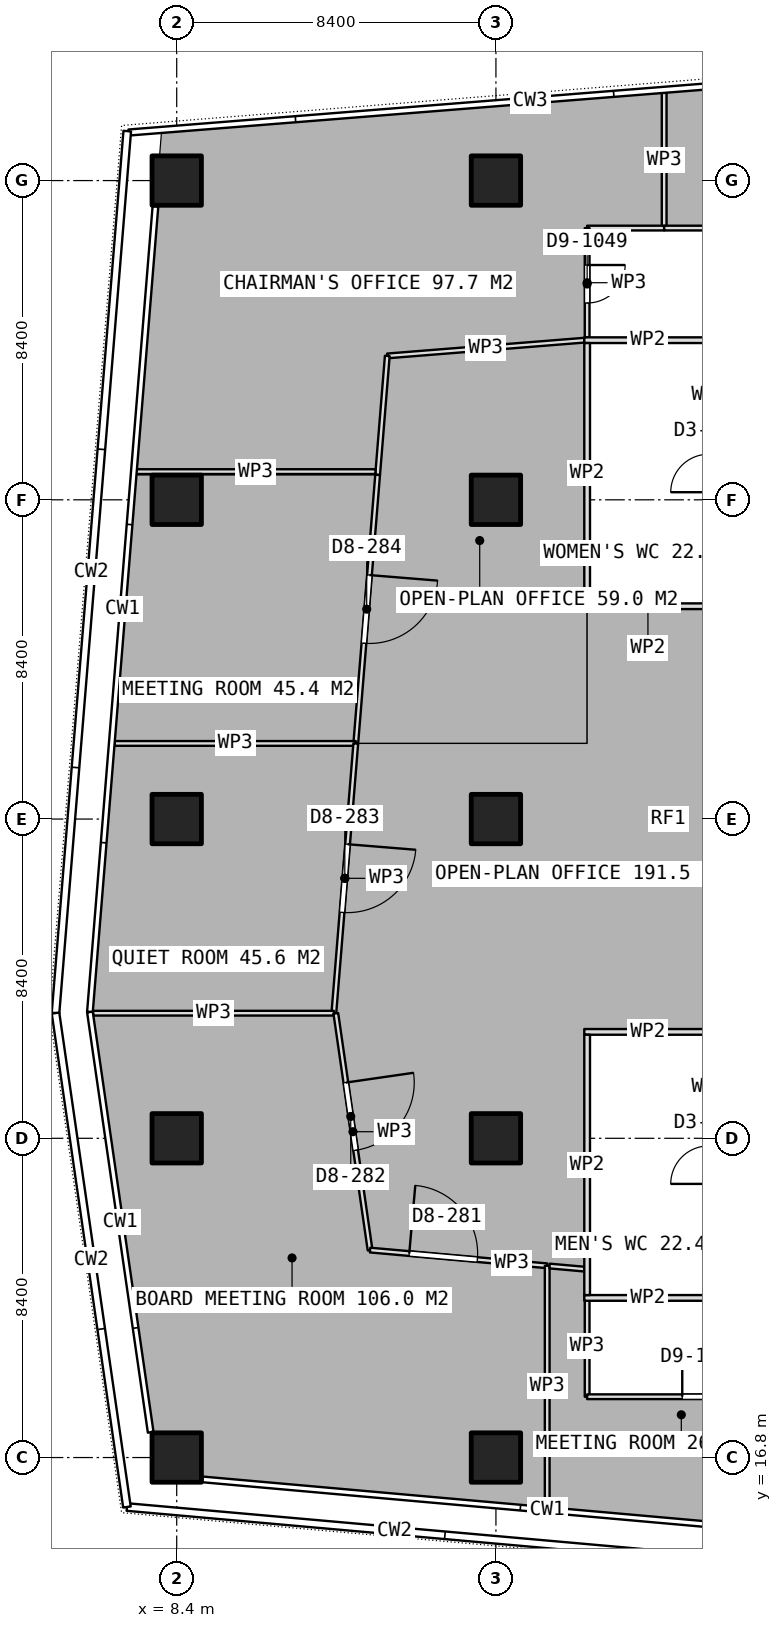
"""IFC4 building model, lengths in metres.
Left out: names, types, materials, properties, quantities, classifications, styles, units other than length and angle.
Written with IfcOpenShell. Run it as: python <this file> out.ifc"""

import sys

from ifc_helpers import new_model, si_unit, direction, frame, frame_2d, origin, origin_2d, place, context, subcontext, project, spatial, rectangle, extrude, element, fill, save


model = new_model("IFC4")
c1 = context("Model", 3, precision=1e-05, world=origin(), true_north=direction((0.0, 1.0)))
c2 = subcontext(c1, "Body", "Model", "MODEL_VIEW")
j1 = project(units=[si_unit("LENGTHUNIT", "METRE"), si_unit("PLANEANGLEUNIT", "RADIAN")], contexts=[c1])
p1 = place(None, origin())
s1 = spatial("IfcSite", under=j1, at=p1, CompositionType="ELEMENT")
p2 = place(p1, origin())
s2 = spatial("IfcBuilding", under=s1, at=p2, CompositionType="ELEMENT")
p3 = place(p2, frame((0.0, 0.0, 283.85)))
s3 = spatial("IfcBuildingStorey", under=s2, at=p3, CompositionType="ELEMENT", Elevation=283.85)
for number, where, z_axis, x_axis in (
    (1, (8.4, 16.8, 0.0), (0.0, 0.0, 1.0), (1.0, 0.0, 0.0)),
    (2, (8.4, 25.2, 0.0), (0.0, 0.0, 1.0), (1.0, 0.0, 0.0)),
    (3, (8.4, 33.6, 0.0), (0.0, 0.0, 1.0), (1.0, 0.0, 0.0)),
    (4, (8.4, 42.0, 0.0), (0.0, 0.0, 1.0), (1.0, 0.0, 0.0)),
    (5, (8.4, 50.4, 0.0), (0.0, 0.0, 1.0), (1.0, 0.0, 0.0)),
    (6, (16.8, 16.8, 0.0), (0.0, 0.0, 1.0), (1.0, 0.0, 0.0)),
    (7, (16.8, 25.2, 0.0), (0.0, 0.0, 1.0), (1.0, 0.0, 0.0)),
    (8, (16.8, 33.6, 0.0), (0.0, 0.0, 1.0), (1.0, 0.0, 0.0)),
    (9, (16.8, 42.0, 0.0), (0.0, 0.0, 1.0), (1.0, 0.0, 0.0)),
    (10, (16.8, 50.4, 0.0), (0.0, 0.0, 1.0), (1.0, 0.0, 0.0)),
):
    element("IfcColumn", number, at=place(p3, frame(where, z_axis=z_axis, x_axis=x_axis)), inside=s3, PredefinedType="COLUMN", context=c2, shape_type="SweptSolid", body=[
        extrude(rectangle(XDim=1.3, YDim=1.3, at=origin_2d()), origin(), (0.0, 0.0, 1.0), 3.75),
    ])
for number, where, z_axis, x_axis in (
    (11, (19.125, 39.2, 0.0), (0.0, 0.0, 1.0), (1.0, 0.0, 0.0)),
    (12, (19.125, 46.2, 0.0), (0.0, 0.0, 1.0), (1.0, 0.0, 0.0)),
):
    element("IfcWall", number, at=place(p3, frame(where, z_axis=z_axis, x_axis=x_axis)), inside=s3, PredefinedType="PARTITIONING", context=c2, shape_type="SweptSolid", body=[
        extrude(rectangle(XDim=3.35, YDim=0.15, at=frame_2d((1.675, 0.0))), origin(), (0.0, 0.0, 1.0), 3.5),
    ])
p4 = place(p3, frame((19.2, 39.275, 0.0), z_axis=(0.0, 0.0, 1.0), x_axis=(0.0, 1.0, 0.0)))
e13 = element("IfcWall", 13, at=p4, inside=s3, PredefinedType="PARTITIONING", context=c2, shape_type="SweptSolid", body=[
    extrude(rectangle(XDim=6.85, YDim=0.15, at=frame_2d((3.425, 0.0))), origin(), (0.0, 0.0, 1.0), 3.5),
])
for number, where, z_axis, x_axis in (
    (14, (19.125, 21.0, 0.0), (0.0, 0.0, 1.0), (1.0, 0.0, 0.0)),
    (15, (19.125, 28.0, 0.0), (0.0, 0.0, 1.0), (1.0, 0.0, 0.0)),
):
    element("IfcWall", number, at=place(p3, frame(where, z_axis=z_axis, x_axis=x_axis)), inside=s3, PredefinedType="PARTITIONING", context=c2, shape_type="SweptSolid", body=[
        extrude(rectangle(XDim=3.35, YDim=0.15, at=frame_2d((1.675, 0.0))), origin(), (0.0, 0.0, 1.0), 3.5),
    ])
p5 = place(p3, frame((19.2, 21.075, 0.0), z_axis=(0.0, 0.0, 1.0), x_axis=(0.0, 1.0, 0.0)))
e16 = element("IfcWall", 16, at=p5, inside=s3, PredefinedType="PARTITIONING", context=c2, shape_type="SweptSolid", body=[
    extrude(rectangle(XDim=6.85, YDim=0.15, at=frame_2d((3.425, 0.0))), origin(), (0.0, 0.0, 1.0), 3.5),
])
p6 = place(p3, frame((25.205, 49.15, 0.0), z_axis=(0.0, 0.0, 1.0), x_axis=(-1.0, 0.0, 0.0)))
e17 = element("IfcWall", 17, at=p6, inside=s3, PredefinedType="PARTITIONING", context=c2, shape_type="SweptSolid", body=[
    extrude(rectangle(XDim=3.978, YDim=0.125, at=frame_2d((1.989, 0.0))), origin(), (0.0, 0.0, 1.0), 3.5),
])
p7 = place(p3, frame((21.227, 49.15, 0.0), z_axis=(0.0, 0.0, 1.0), x_axis=(0.0, 1.0, 0.0)))
e18 = element("IfcWall", 18, at=p7, inside=s3, PredefinedType="PARTITIONING", context=c2, shape_type="SweptSolid", body=[
    extrude(rectangle(XDim=3.558, YDim=0.125, at=frame_2d((1.779, 0.0))), origin(), (0.0, 0.0, 1.0), 3.5),
])
p8 = place(p3, frame((19.125, 46.2, 0.0), z_axis=(0.0, 0.0, 1.0), x_axis=(-0.996825420684, -0.079618343858, 0.0)))
e19 = element("IfcWall", 19, at=p8, inside=s3, PredefinedType="PARTITIONING", context=c2, shape_type="SweptSolid", body=[
    extrude(rectangle(XDim=5.201, YDim=0.125, at=frame_2d((2.6, 0.0))), origin(), (0.0, 0.0, 1.0), 3.5),
])
p9 = place(p3, frame((13.941, 45.786, 0.0), z_axis=(0.0, 0.0, 1.0), x_axis=(-0.080882691395, -0.996723627809, 0.0)))
e20 = element("IfcWall", 20, at=p9, inside=s3, PredefinedType="PARTITIONING", context=c2, shape_type="SweptSolid", body=[
    extrude(rectangle(XDim=3.139, YDim=0.125, at=frame_2d((1.57, 0.0))), origin(), (0.0, 0.0, 1.0), 3.5),
])
p10 = place(p3, frame((13.631, 42.742, 0.0), z_axis=(0.0, 0.0, 1.0), x_axis=(-1.0, 0.0, 0.0)))
e21 = element("IfcWall", 21, at=p10, inside=s3, PredefinedType="PARTITIONING", context=c2, shape_type="SweptSolid", body=[
    extrude(rectangle(XDim=6.308, YDim=0.125, at=frame_2d((3.154, 0.0))), origin(), (0.0, 0.0, 1.0), 3.5),
])
p11 = place(p3, frame((21.226, 49.15, 0.0), z_axis=(0.0, 0.0, 1.0), x_axis=(-1.0, 0.0, 0.0)))
e22 = element("IfcWall", 22, at=p11, inside=s3, PredefinedType="PARTITIONING", context=c2, shape_type="SweptSolid", body=[
    extrude(rectangle(XDim=2.026, YDim=0.125, at=frame_2d((1.013, 0.0))), origin(), (0.0, 0.0, 1.0), 3.5),
])
p12 = place(p3, frame((19.2, 49.15, 0.0), z_axis=(0.0, 0.0, 1.0), x_axis=(0.0, -1.0, 0.0)))
e23 = element("IfcWall", 23, at=p12, inside=s3, PredefinedType="PARTITIONING", context=c2, shape_type="SweptSolid", body=[
    extrude(rectangle(XDim=2.875, YDim=0.125, at=frame_2d((1.438, 0.0))), origin(), (0.0, 0.0, 1.0), 3.5),
])
p13 = place(p12, frame((0.972, 0.0, 0.0)))
e24 = element("IfcOpeningElement", 24, at=p13, cuts=e23, PredefinedType="OPENING", context=c2, shape_type="SweptSolid", body=[
    extrude(rectangle(XDim=1.0, YDim=2.1, at=frame_2d((0.5, 1.05))), frame((0.0, 0.073, 0.0), z_axis=(0.0, -1.0, 0.0), x_axis=(1.0, 0.0, 0.0)), (0.0, 0.0, 1.0), 0.145),
])
p14 = place(p3, frame((13.687, 42.656, 0.0), z_axis=(0.0, 0.0, 1.0), x_axis=(-0.08110159124, -0.996705840205, 0.0)))
e25 = element("IfcWall", 25, at=p14, inside=s3, PredefinedType="PARTITIONING", context=c2, shape_type="SweptSolid", body=[
    extrude(rectangle(XDim=7.089, YDim=0.125, at=frame_2d((3.545, 0.0))), origin(), (0.0, 0.0, 1.0), 3.5),
])
p15 = place(p14, frame((2.645, 0.0, 0.0)))
e26 = element("IfcOpeningElement", 26, at=p15, cuts=e25, PredefinedType="OPENING", context=c2, shape_type="SweptSolid", body=[
    extrude(rectangle(XDim=1.8, YDim=2.1, at=frame_2d((0.9, 1.05))), frame((0.0, 0.073, 0.0), z_axis=(0.0, -1.0, 0.0), x_axis=(1.0, 0.0, 0.0)), (0.0, 0.0, 1.0), 0.145),
])
p16 = place(p3, frame((13.112, 35.59, 0.0), z_axis=(0.0, 0.0, 1.0), x_axis=(-1.0, 0.0, 0.0)))
e27 = element("IfcWall", 27, at=p16, inside=s3, PredefinedType="PARTITIONING", context=c2, shape_type="SweptSolid", body=[
    extrude(rectangle(XDim=6.341, YDim=0.125, at=frame_2d((3.17, 0.0))), origin(), (0.0, 0.0, 1.0), 3.5),
])
p17 = place(p3, frame((13.112, 35.589, 0.0), z_axis=(0.0, 0.0, 1.0), x_axis=(-0.081053384124, -0.996709761627, 0.0)))
e28 = element("IfcWall", 28, at=p17, inside=s3, PredefinedType="PARTITIONING", context=c2, shape_type="SweptSolid", body=[
    extrude(rectangle(XDim=7.121, YDim=0.125, at=frame_2d((3.56, 0.0))), origin(), (0.0, 0.0, 1.0), 3.5),
])
p18 = place(p17, frame((2.66, 0.0, 0.0)))
e29 = element("IfcOpeningElement", 29, at=p18, cuts=e28, PredefinedType="OPENING", context=c2, shape_type="SweptSolid", body=[
    extrude(rectangle(XDim=1.8, YDim=2.1, at=frame_2d((0.9, 1.05))), frame((0.0, 0.073, 0.0), z_axis=(0.0, -1.0, 0.0), x_axis=(1.0, 0.0, 0.0)), (0.0, 0.0, 1.0), 0.145),
])
p19 = place(p3, frame((12.535, 28.492, 0.0), z_axis=(0.0, 0.0, 1.0), x_axis=(-1.0, 0.0, 0.0)))
e30 = element("IfcWall", 30, at=p19, inside=s3, PredefinedType="PARTITIONING", context=c2, shape_type="SweptSolid", body=[
    extrude(rectangle(XDim=6.334, YDim=0.125, at=frame_2d((3.167, 0.0))), origin(), (0.0, 0.0, 1.0), 3.5),
])
p20 = place(p3, frame((12.587, 28.488, 0.0), z_axis=(0.0, 0.0, 1.0), x_axis=(0.143175234502, -0.989697353854, 0.0)))
e31 = element("IfcWall", 31, at=p20, inside=s3, PredefinedType="PARTITIONING", context=c2, shape_type="SweptSolid", body=[
    extrude(rectangle(XDim=6.294, YDim=0.125, at=frame_2d((3.147, 0.0))), origin(), (0.0, 0.0, 1.0), 3.5),
])
p21 = place(p20, frame((1.841, 0.0, 0.0)))
e32 = element("IfcOpeningElement", 32, at=p21, cuts=e31, PredefinedType="OPENING", context=c2, shape_type="SweptSolid", body=[
    extrude(rectangle(XDim=1.8, YDim=2.1, at=frame_2d((0.9, 1.05))), frame((0.0, 0.073, 0.0), z_axis=(0.0, -1.0, 0.0), x_axis=(1.0, 0.0, 0.0)), (0.0, 0.0, 1.0), 0.145),
])
p22 = place(p3, frame((13.488, 22.259, 0.0), z_axis=(0.0, 0.0, 1.0), x_axis=(0.996077138593, -0.088489174326, 0.0)))
e33 = element("IfcWall", 33, at=p22, inside=s3, PredefinedType="PARTITIONING", context=c2, shape_type="SweptSolid", body=[
    extrude(rectangle(XDim=4.679, YDim=0.125, at=frame_2d((2.34, 0.0))), origin(), (0.0, 0.0, 1.0), 3.5),
])
p23 = place(p22, frame((1.035, 0.0, 0.0)))
e34 = element("IfcOpeningElement", 34, at=p23, cuts=e33, PredefinedType="OPENING", context=c2, shape_type="SweptSolid", body=[
    extrude(rectangle(XDim=1.8, YDim=2.1, at=frame_2d((0.9, 1.05))), frame((0.0, 0.073, 0.0), z_axis=(0.0, -1.0, 0.0), x_axis=(1.0, 0.0, 0.0)), (0.0, 0.0, 1.0), 0.145),
])
p24 = place(p3, frame((18.149, 21.845, 0.0), z_axis=(0.0, 0.0, 1.0), x_axis=(0.0, -1.0, 0.0)))
e35 = element("IfcWall", 35, at=p24, inside=s3, PredefinedType="PARTITIONING", context=c2, shape_type="SweptSolid", body=[
    extrude(rectangle(XDim=6.345, YDim=0.125, at=frame_2d((3.172, 0.0))), origin(), (0.0, 0.0, 1.0), 3.5),
])
p25 = place(p3, frame((18.212, 21.839, 0.0), z_axis=(0.0, 0.0, 1.0), x_axis=(0.996083073059, -0.088422347662, 0.0)))
e36 = element("IfcWall", 36, at=p25, inside=s3, PredefinedType="PARTITIONING", context=c2, shape_type="SweptSolid", body=[
    extrude(rectangle(XDim=0.917, YDim=0.125, at=frame_2d((0.458, 0.0))), origin(), (0.0, 0.0, 1.0), 3.5),
])
p26 = place(p3, frame((19.2, 21.075, 0.0), z_axis=(0.0, 0.0, 1.0), x_axis=(0.0, -1.0, 0.0)))
e37 = element("IfcWall", 37, at=p26, inside=s3, PredefinedType="PARTITIONING", context=c2, shape_type="SweptSolid", body=[
    extrude(rectangle(XDim=2.675, YDim=0.125, at=frame_2d((1.337, 0.0))), origin(), (0.0, 0.0, 1.0), 3.5),
])
p27 = place(p3, frame((19.2, 18.4, 0.0), z_axis=(0.0, 0.0, 1.0), x_axis=(1.0, 0.0, 0.0)))
e38 = element("IfcWall", 38, at=p27, inside=s3, PredefinedType="PARTITIONING", context=c2, shape_type="SweptSolid", body=[
    extrude(rectangle(XDim=6.006, YDim=0.125, at=frame_2d((3.003, 0.0))), origin(), (0.0, 0.0, 1.0), 3.5),
])
p28 = place(p27, frame((2.503, 0.0, 0.0)))
e39 = element("IfcOpeningElement", 39, at=p28, cuts=e38, PredefinedType="OPENING", context=c2, shape_type="SweptSolid", body=[
    extrude(rectangle(XDim=1.0, YDim=2.1, at=frame_2d((0.5, 1.05))), frame((0.0, 0.073, 0.0), z_axis=(0.0, -1.0, 0.0), x_axis=(1.0, 0.0, 0.0)), (0.0, 0.0, 1.0), 0.145),
])
p29 = place(p13, origin())
e40 = element("IfcDoor", 40, at=p29, inside=s3, OperationType="SINGLE_SWING_LEFT", PredefinedType="DOOR", context=c2, shape_type="SweptSolid", body=[
    extrude(rectangle(XDim=1.0, YDim=2.1, at=frame_2d((0.5, 1.05))), frame((0.0, 0.025, 0.0), z_axis=(0.0, -1.0, 0.0), x_axis=(1.0, 0.0, 0.0)), (0.0, 0.0, 1.0), 0.05),
])
fill(e24, e40)
p30 = place(p15, origin())
e41 = element("IfcDoor", 41, at=p30, inside=s3, OperationType="DOUBLE_DOOR_SINGLE_SWING", PredefinedType="DOOR", context=c2, shape_type="SweptSolid", body=[
    extrude(rectangle(XDim=1.8, YDim=2.1, at=frame_2d((0.9, 1.05))), frame((0.0, 0.025, 0.0), z_axis=(0.0, -1.0, 0.0), x_axis=(1.0, 0.0, 0.0)), (0.0, 0.0, 1.0), 0.05),
])
fill(e26, e41)
p31 = place(p18, origin())
e42 = element("IfcDoor", 42, at=p31, inside=s3, OperationType="DOUBLE_DOOR_SINGLE_SWING", PredefinedType="DOOR", context=c2, shape_type="SweptSolid", body=[
    extrude(rectangle(XDim=1.8, YDim=2.1, at=frame_2d((0.9, 1.05))), frame((0.0, 0.025, 0.0), z_axis=(0.0, -1.0, 0.0), x_axis=(1.0, 0.0, 0.0)), (0.0, 0.0, 1.0), 0.05),
])
fill(e29, e42)
p32 = place(p21, origin())
e43 = element("IfcDoor", 43, at=p32, inside=s3, OperationType="DOUBLE_DOOR_SINGLE_SWING", PredefinedType="DOOR", context=c2, shape_type="SweptSolid", body=[
    extrude(rectangle(XDim=1.8, YDim=2.1, at=frame_2d((0.9, 1.05))), frame((0.0, 0.025, 0.0), z_axis=(0.0, -1.0, 0.0), x_axis=(1.0, 0.0, 0.0)), (0.0, 0.0, 1.0), 0.05),
])
fill(e32, e43)
p33 = place(p23, origin())
e44 = element("IfcDoor", 44, at=p33, inside=s3, OperationType="DOUBLE_DOOR_SINGLE_SWING", PredefinedType="DOOR", context=c2, shape_type="SweptSolid", body=[
    extrude(rectangle(XDim=1.8, YDim=2.1, at=frame_2d((0.9, 1.05))), frame((0.0, 0.025, 0.0), z_axis=(0.0, -1.0, 0.0), x_axis=(1.0, 0.0, 0.0)), (0.0, 0.0, 1.0), 0.05),
])
fill(e34, e44)
p34 = place(p28, origin())
e45 = element("IfcDoor", 45, at=p34, inside=s3, OperationType="SINGLE_SWING_LEFT", PredefinedType="DOOR", context=c2, shape_type="SweptSolid", body=[
    extrude(rectangle(XDim=1.0, YDim=2.1, at=frame_2d((0.5, 1.05))), frame((0.0, 0.025, 0.0), z_axis=(0.0, -1.0, 0.0), x_axis=(1.0, 0.0, 0.0)), (0.0, 0.0, 1.0), 0.05),
])
fill(e39, e45)
save(model, sys.argv[1])
